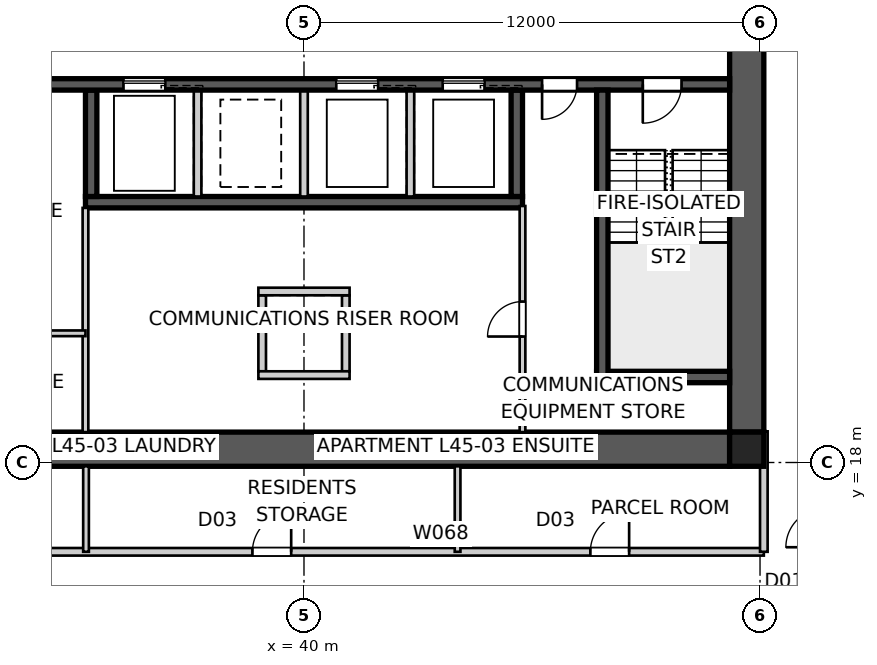
"""IFC4 building model, lengths in metres.
Left out: names, types, materials, properties, quantities, classifications, styles, units other than length and angle.
Written with IfcOpenShell. Run it as: python <this file> out.ifc"""

import sys

from ifc_helpers import new_model, si_unit, direction, frame, frame_2d, origin, origin_2d, place, context, subcontext, project, spatial, polyline, rectangle, outline, extrude, element, fill, save


model = new_model("IFC4")
c1 = context("Model", 3, precision=1e-05, world=origin(), true_north=direction((0.0, 1.0)))
c2 = subcontext(c1, "Body", "Model", "MODEL_VIEW")
j1 = project(units=[si_unit("LENGTHUNIT", "METRE"), si_unit("PLANEANGLEUNIT", "RADIAN")], contexts=[c1])
p1 = place(None, origin())
s1 = spatial("IfcSite", under=j1, at=p1, CompositionType="ELEMENT")
p2 = place(p1, origin())
s2 = spatial("IfcBuilding", under=s1, at=p2, CompositionType="ELEMENT")
p3 = place(p2, frame((0.0, 0.0, 164.2)))
s3 = spatial("IfcBuildingStorey", under=s2, at=p3, CompositionType="ELEMENT", Elevation=164.2)
p4 = place(p3, frame((51.2, 18.35, 0.0), z_axis=(0.0, 0.0, 1.0), x_axis=(-1.0, 0.0, 0.0)))
e1 = element("IfcWall", 1, at=p4, inside=s3, PredefinedType="SHEAR", context=c2, shape_type="SweptSolid", body=[
    extrude(outline(polyline([(0.0, -0.45), (22.4, -0.45), (22.4, -0.025), (22.85, -0.025), (22.85, 0.025), (22.4, 0.025), (22.4, 0.45), (0.0, 0.45), (0.0, 0.025), (-0.45, 0.025), (-0.45, -0.025), (0.0, -0.025), (0.0, -0.45)])), origin(), (0.0, 0.0, 1.0), 3.4),
])
p5 = place(p3, frame((51.65, 18.8, 0.0), z_axis=(0.0, 0.0, 1.0), x_axis=(0.0, 1.0, 0.0)))
e2 = element("IfcWall", 2, at=p5, inside=s3, PredefinedType="SHEAR", context=c2, shape_type="SweptSolid", body=[
    extrude(outline(polyline([(0.0, -0.45), (22.4, -0.45), (22.4, -0.025), (22.85, -0.025), (22.85, 0.025), (22.4, 0.025), (22.4, 0.45), (0.0, 0.45), (0.0, 0.025), (-0.45, 0.025), (-0.45, -0.025), (0.0, -0.025), (0.0, -0.45)])), origin(), (0.0, 0.0, 1.0), 3.4),
])
p6 = place(p5, frame((11.14, 0.0, 0.0)))
e3 = element("IfcOpeningElement", 3, at=p6, cuts=e2, PredefinedType="OPENING", context=c2, shape_type="SweptSolid", body=[
    extrude(rectangle(XDim=1.02, YDim=2.4, at=frame_2d((0.51, 1.2))), frame((0.0, 0.46, 0.0), z_axis=(0.0, -1.0, 0.0), x_axis=(1.0, 0.0, 0.0)), (0.0, 0.0, 1.0), 0.92),
])
p7 = place(p3, frame((51.2, 27.95, 0.0), z_axis=(0.0, 0.0, 1.0), x_axis=(-1.0, 0.0, 0.0)))
e4 = element("IfcWall", 4, at=p7, inside=s3, PredefinedType="SHEAR", context=c2, shape_type="SweptSolid", body=[
    extrude(rectangle(XDim=22.4, YDim=0.3, at=frame_2d((11.2, 0.0))), origin(), (0.0, 0.0, 1.0), 3.4),
])
p8 = place(p7, frame((19.04, 0.0, 0.0)))
e5 = element("IfcOpeningElement", 5, at=p8, cuts=e4, PredefinedType="OPENING", context=c2, shape_type="SweptSolid", body=[
    extrude(rectangle(XDim=0.92, YDim=2.1, at=frame_2d((0.46, 1.05))), frame((0.0, 0.16, 0.0), z_axis=(0.0, -1.0, 0.0), x_axis=(1.0, 0.0, 0.0)), (0.0, 0.0, 1.0), 0.32),
])
p9 = place(p7, frame((1.265, 0.0, 0.0)))
e6 = element("IfcOpeningElement", 6, at=p9, cuts=e4, PredefinedType="OPENING", context=c2, shape_type="SweptSolid", body=[
    extrude(rectangle(XDim=1.02, YDim=2.1, at=frame_2d((0.51, 1.05))), frame((0.0, 0.16, 0.0), z_axis=(0.0, -1.0, 0.0), x_axis=(1.0, 0.0, 0.0)), (0.0, 0.0, 1.0), 0.32),
])
p10 = place(p7, frame((4.015, 0.0, 0.0)))
e7 = element("IfcOpeningElement", 7, at=p10, cuts=e4, PredefinedType="OPENING", context=c2, shape_type="SweptSolid", body=[
    extrude(rectangle(XDim=0.92, YDim=2.1, at=frame_2d((0.46, 1.05))), frame((0.0, 0.16, 0.0), z_axis=(0.0, -1.0, 0.0), x_axis=(1.0, 0.0, 0.0)), (0.0, 0.0, 1.0), 0.32),
])
p11 = place(p7, frame((6.45, 0.0, 0.0)))
e8 = element("IfcOpeningElement", 8, at=p11, cuts=e4, PredefinedType="OPENING", context=c2, shape_type="SweptSolid", body=[
    extrude(rectangle(XDim=1.1, YDim=2.1, at=frame_2d((0.55, 1.05))), frame((0.0, 0.16, 0.0), z_axis=(0.0, -1.0, 0.0), x_axis=(1.0, 0.0, 0.0)), (0.0, 0.0, 1.0), 0.32),
])
p12 = place(p7, frame((9.25, 0.0, 0.0)))
e9 = element("IfcOpeningElement", 9, at=p12, cuts=e4, PredefinedType="OPENING", context=c2, shape_type="SweptSolid", body=[
    extrude(rectangle(XDim=1.1, YDim=2.1, at=frame_2d((0.55, 1.05))), frame((0.0, 0.16, 0.0), z_axis=(0.0, -1.0, 0.0), x_axis=(1.0, 0.0, 0.0)), (0.0, 0.0, 1.0), 0.32),
])
p13 = place(p7, frame((14.85, 0.0, 0.0)))
e10 = element("IfcOpeningElement", 10, at=p13, cuts=e4, PredefinedType="OPENING", context=c2, shape_type="SweptSolid", body=[
    extrude(rectangle(XDim=1.1, YDim=2.1, at=frame_2d((0.55, 1.05))), frame((0.0, 0.16, 0.0), z_axis=(0.0, -1.0, 0.0), x_axis=(1.0, 0.0, 0.0)), (0.0, 0.0, 1.0), 0.32),
])
p14 = place(p3, frame((45.75, 24.85, 0.0), z_axis=(0.0, 0.0, 1.0), x_axis=(-1.0, 0.0, 0.0)))
e11 = element("IfcWall", 11, at=p14, inside=s3, PredefinedType="SHEAR", context=c2, shape_type="SweptSolid", body=[
    extrude(rectangle(XDim=11.5, YDim=0.3, at=frame_2d((5.75, 0.0))), origin(), (0.0, 0.0, 1.0), 3.4),
])
p15 = place(p3, frame((45.6, 27.8, 0.0), z_axis=(0.0, 0.0, 1.0), x_axis=(0.0, -1.0, 0.0)))
e12 = element("IfcWall", 12, at=p15, inside=s3, PredefinedType="SHEAR", context=c2, shape_type="SweptSolid", body=[
    extrude(rectangle(XDim=2.8, YDim=0.3, at=frame_2d((1.4, 0.0))), origin(), (0.0, 0.0, 1.0), 3.4),
])
for number, where, z_axis, x_axis in (
    (13, (42.8, 27.8, 0.0), (0.0, 0.0, 1.0), (0.0, -1.0, 0.0)),
    (14, (40.0, 27.8, 0.0), (0.0, 0.0, 1.0), (0.0, -1.0, 0.0)),
    (15, (37.2, 27.8, 0.0), (0.0, 0.0, 1.0), (0.0, -1.0, 0.0)),
):
    element("IfcWall", number, at=place(p3, frame(where, z_axis=z_axis, x_axis=x_axis)), inside=s3, PredefinedType="SOLIDWALL", context=c2, shape_type="SweptSolid", body=[
        extrude(rectangle(XDim=2.8, YDim=0.2, at=frame_2d((1.4, 0.0))), origin(), (0.0, 0.0, 1.0), 3.4),
    ])
p16 = place(p3, frame((34.4, 27.8, 0.0), z_axis=(0.0, 0.0, 1.0), x_axis=(0.0, -1.0, 0.0)))
e16 = element("IfcWall", 16, at=p16, inside=s3, PredefinedType="SHEAR", context=c2, shape_type="SweptSolid", body=[
    extrude(rectangle(XDim=2.8, YDim=0.3, at=frame_2d((1.4, 0.0))), origin(), (0.0, 0.0, 1.0), 3.4),
])
p17 = place(p3, frame((47.85, 27.8, 0.0), z_axis=(0.0, 0.0, 1.0), x_axis=(0.0, -1.0, 0.0)))
e17 = element("IfcWall", 17, at=p17, inside=s3, PredefinedType="SHEAR", context=c2, shape_type="SweptSolid", body=[
    extrude(rectangle(XDim=7.7, YDim=0.3, at=frame_2d((3.85, 0.0))), origin(), (0.0, 0.0, 1.0), 3.4),
])
p18 = place(p3, frame((51.2, 20.25, 0.0), z_axis=(0.0, 0.0, 1.0), x_axis=(-1.0, 0.0, 0.0)))
e18 = element("IfcWall", 18, at=p18, inside=s3, PredefinedType="SHEAR", context=c2, shape_type="SweptSolid", body=[
    extrude(rectangle(XDim=3.5, YDim=0.3, at=frame_2d((1.75, 0.0))), origin(), (0.0, 0.0, 1.0), 3.4),
])
for number, where, z_axis, x_axis in (
    (19, (38.9, 22.4, 0.0), (0.0, 0.0, 1.0), (0.0, -1.0, 0.0)),
    (20, (41.1, 22.4, 0.0), (0.0, 0.0, 1.0), (0.0, -1.0, 0.0)),
):
    element("IfcWall", number, at=place(p3, frame(where, z_axis=z_axis, x_axis=x_axis)), inside=s3, PredefinedType="SOLIDWALL", context=c2, shape_type="SweptSolid", body=[
        extrude(rectangle(XDim=2.0, YDim=0.2, at=frame_2d((1.0, 0.0))), origin(), (0.0, 0.0, 1.0), 3.4),
    ])
for number, where, z_axis, x_axis in (
    (21, (38.8, 22.5, 0.0), (0.0, 0.0, 1.0), (1.0, 0.0, 0.0)),
    (22, (38.8, 20.3, 0.0), (0.0, 0.0, 1.0), (1.0, 0.0, 0.0)),
):
    element("IfcWall", number, at=place(p3, frame(where, z_axis=z_axis, x_axis=x_axis)), inside=s3, PredefinedType="SOLIDWALL", context=c2, shape_type="SweptSolid", body=[
        extrude(rectangle(XDim=2.4, YDim=0.2, at=frame_2d((1.2, 0.0))), origin(), (0.0, 0.0, 1.0), 3.4),
    ])
p19 = place(p3, frame((51.65, 18.35, 0.0), z_axis=(0.0, 0.0, 1.0), x_axis=(1.0, 0.0, 0.0)))
e23 = element("IfcColumn", 23, at=p19, inside=s3, PredefinedType="COLUMN", context=c2, shape_type="SweptSolid", body=[
    extrude(rectangle(XDim=0.9, YDim=0.9, at=origin_2d()), origin(), (0.0, 0.0, 1.0), 3.4),
])
p20 = place(p3, frame((45.75, 18.8, 0.0), z_axis=(0.0, 0.0, 1.0), x_axis=(0.0, 1.0, 0.0)))
e24 = element("IfcWall", 24, at=p20, inside=s3, PredefinedType="SOLIDWALL", context=c2, shape_type="SweptSolid", body=[
    extrude(rectangle(XDim=5.95, YDim=0.15, at=frame_2d((2.975, 0.0))), origin(), (0.0, 0.0, 1.0), 3.25),
])
p21 = place(p20, frame((2.515, 0.0, 0.0)))
e25 = element("IfcOpeningElement", 25, at=p21, cuts=e24, PredefinedType="OPENING", context=c2, shape_type="SweptSolid", body=[
    extrude(rectangle(XDim=0.92, YDim=2.1, at=frame_2d((0.46, 1.05))), frame((0.0, 0.085, 0.0), z_axis=(0.0, -1.0, 0.0), x_axis=(1.0, 0.0, 0.0)), (0.0, 0.0, 1.0), 0.17),
])
p22 = place(p3, frame((34.25, 18.8, 0.0), z_axis=(0.0, 0.0, 1.0), x_axis=(0.0, 1.0, 0.0)))
e26 = element("IfcWall", 26, at=p22, inside=s3, PredefinedType="SOLIDWALL", context=c2, shape_type="SweptSolid", body=[
    extrude(rectangle(XDim=5.9, YDim=0.15, at=frame_2d((2.95, 0.0))), origin(), (0.0, 0.0, 1.0), 3.25),
])
p23 = place(p3, frame((34.25, 21.4, 0.0), z_axis=(0.0, 0.0, 1.0), x_axis=(-1.0, 0.0, 0.0)))
e27 = element("IfcWall", 27, at=p23, inside=s3, PredefinedType="SOLIDWALL", context=c2, shape_type="SweptSolid", body=[
    extrude(rectangle(XDim=5.45, YDim=0.15, at=frame_2d((2.725, 0.0))), origin(), (0.0, 0.0, 1.0), 3.25),
])
p24 = place(p23, frame((2.265, 0.0, 0.0)))
e28 = element("IfcOpeningElement", 28, at=p24, cuts=e27, PredefinedType="OPENING", context=c2, shape_type="SweptSolid", body=[
    extrude(rectangle(XDim=0.92, YDim=2.1, at=frame_2d((0.46, 1.05))), frame((0.0, 0.085, 0.0), z_axis=(0.0, -1.0, 0.0), x_axis=(1.0, 0.0, 0.0)), (0.0, 0.0, 1.0), 0.17),
])
p25 = place(p3, frame((27.9, 15.65, 0.0), z_axis=(0.0, 0.0, 1.0), x_axis=(1.0, 0.0, 0.0)))
e29 = element("IfcWall", 29, at=p25, inside=s3, PredefinedType="PARTITIONING", context=c2, shape_type="SweptSolid", body=[
    extrude(rectangle(XDim=24.2, YDim=0.2, at=frame_2d((12.1, 0.0))), origin(), (0.0, 0.0, 1.0), 3.25),
])
p26 = place(p25, frame((10.743, 0.0, 0.0)))
e30 = element("IfcOpeningElement", 30, at=p26, cuts=e29, PredefinedType="OPENING", context=c2, shape_type="SweptSolid", body=[
    extrude(rectangle(XDim=1.02, YDim=2.1, at=frame_2d((0.51, 1.05))), frame((0.0, 0.11, 0.0), z_axis=(0.0, -1.0, 0.0), x_axis=(1.0, 0.0, 0.0)), (0.0, 0.0, 1.0), 0.22),
])
p27 = place(p25, frame((19.636, 0.0, 0.0)))
e31 = element("IfcOpeningElement", 31, at=p27, cuts=e29, PredefinedType="OPENING", context=c2, shape_type="SweptSolid", body=[
    extrude(rectangle(XDim=1.02, YDim=2.1, at=frame_2d((0.51, 1.05))), frame((0.0, 0.11, 0.0), z_axis=(0.0, -1.0, 0.0), x_axis=(1.0, 0.0, 0.0)), (0.0, 0.0, 1.0), 0.22),
])
p28 = place(p25, frame((3.297, 0.0, 0.0)))
e32 = element("IfcOpeningElement", 32, at=p28, cuts=e29, PredefinedType="OPENING", context=c2, shape_type="SweptSolid", body=[
    extrude(rectangle(XDim=1.02, YDim=2.1, at=frame_2d((0.51, 1.05))), frame((0.0, 0.11, 0.0), z_axis=(0.0, -1.0, 0.0), x_axis=(1.0, 0.0, 0.0)), (0.0, 0.0, 1.0), 0.22),
])
p29 = place(p3, frame((52.1, 15.65, 0.0), z_axis=(0.0, 0.0, 1.0), x_axis=(0.0, 1.0, 0.0)))
e33 = element("IfcWall", 33, at=p29, inside=s3, PredefinedType="PARTITIONING", context=c2, shape_type="SweptSolid", body=[
    extrude(rectangle(XDim=3.17, YDim=0.2, at=frame_2d((1.585, 0.0))), origin(), (0.0, 0.0, 1.0), 3.25),
])
p30 = place(p3, frame((34.265, 15.65, 0.0), z_axis=(0.0, 0.0, 1.0), x_axis=(0.0, 1.0, 0.0)))
e34 = element("IfcWall", 34, at=p30, inside=s3, PredefinedType="SOLIDWALL", context=c2, shape_type="SweptSolid", body=[
    extrude(rectangle(XDim=2.25, YDim=0.15, at=frame_2d((1.125, 0.0))), origin(), (0.0, 0.0, 1.0), 2.796),
])
p31 = place(p3, frame((44.042, 15.65, 0.0), z_axis=(0.0, 0.0, 1.0), x_axis=(0.0, 1.0, 0.0)))
e35 = element("IfcWall", 35, at=p31, inside=s3, PredefinedType="SOLIDWALL", context=c2, shape_type="SweptSolid", body=[
    extrude(rectangle(XDim=2.25, YDim=0.15, at=frame_2d((1.125, 0.0))), origin(), (0.0, 0.0, 1.0), 3.25),
])
p32 = place(p9, origin())
e36 = element("IfcDoor", 36, at=p32, inside=s3, OperationType="SINGLE_SWING_RIGHT", PredefinedType="DOOR", context=c2, shape_type="SweptSolid", body=[
    extrude(rectangle(XDim=1.02, YDim=2.1, at=frame_2d((0.51, 1.05))), frame((0.0, 0.025, 0.0), z_axis=(0.0, -1.0, 0.0), x_axis=(1.0, 0.0, 0.0)), (0.0, 0.0, 1.0), 0.05),
])
fill(e6, e36)
p33 = place(p10, origin())
e37 = element("IfcDoor", 37, at=p33, inside=s3, OperationType="SINGLE_SWING_RIGHT", PredefinedType="DOOR", context=c2, shape_type="SweptSolid", body=[
    extrude(rectangle(XDim=0.92, YDim=2.1, at=frame_2d((0.46, 1.05))), frame((0.0, 0.025, 0.0), z_axis=(0.0, -1.0, 0.0), x_axis=(1.0, 0.0, 0.0)), (0.0, 0.0, 1.0), 0.05),
])
fill(e7, e37)
p34 = place(p26, origin())
e38 = element("IfcDoor", 38, at=p34, inside=s3, OperationType="SINGLE_SWING_RIGHT", PredefinedType="DOOR", context=c2, shape_type="SweptSolid", body=[
    extrude(rectangle(XDim=1.02, YDim=2.1, at=frame_2d((0.51, 1.05))), frame((0.0, 0.025, 0.0), z_axis=(0.0, -1.0, 0.0), x_axis=(1.0, 0.0, 0.0)), (0.0, 0.0, 1.0), 0.05),
])
fill(e30, e38)
p35 = place(p27, origin())
e39 = element("IfcDoor", 39, at=p35, inside=s3, OperationType="SINGLE_SWING_RIGHT", PredefinedType="DOOR", context=c2, shape_type="SweptSolid", body=[
    extrude(rectangle(XDim=1.02, YDim=2.1, at=frame_2d((0.51, 1.05))), frame((0.0, 0.025, 0.0), z_axis=(0.0, -1.0, 0.0), x_axis=(1.0, 0.0, 0.0)), (0.0, 0.0, 1.0), 0.05),
])
fill(e31, e39)
p36 = place(p21, origin())
e40 = element("IfcDoor", 40, at=p36, inside=s3, OperationType="SINGLE_SWING_LEFT", PredefinedType="DOOR", context=c2, shape_type="SweptSolid", body=[
    extrude(rectangle(XDim=0.92, YDim=2.1, at=frame_2d((0.46, 1.05))), frame((0.0, 0.025, 0.0), z_axis=(0.0, -1.0, 0.0), x_axis=(1.0, 0.0, 0.0)), (0.0, 0.0, 1.0), 0.05),
])
fill(e25, e40)
p37 = place(p11, origin())
e41 = element("IfcDoor", 41, at=p37, inside=s3, OperationType="SLIDING_TO_LEFT", PredefinedType="DOOR", context=c2, shape_type="SweptSolid", body=[
    extrude(rectangle(XDim=1.1, YDim=2.1, at=frame_2d((0.55, 1.05))), frame((0.0, 0.025, 0.0), z_axis=(0.0, -1.0, 0.0), x_axis=(1.0, 0.0, 0.0)), (0.0, 0.0, 1.0), 0.05),
])
fill(e8, e41)
p38 = place(p12, origin())
e42 = element("IfcDoor", 42, at=p38, inside=s3, OperationType="SLIDING_TO_LEFT", PredefinedType="DOOR", context=c2, shape_type="SweptSolid", body=[
    extrude(rectangle(XDim=1.1, YDim=2.1, at=frame_2d((0.55, 1.05))), frame((0.0, 0.025, 0.0), z_axis=(0.0, -1.0, 0.0), x_axis=(1.0, 0.0, 0.0)), (0.0, 0.0, 1.0), 0.05),
])
fill(e9, e42)
p39 = place(p13, origin())
e43 = element("IfcDoor", 43, at=p39, inside=s3, OperationType="SLIDING_TO_LEFT", PredefinedType="DOOR", context=c2, shape_type="SweptSolid", body=[
    extrude(rectangle(XDim=1.1, YDim=2.1, at=frame_2d((0.55, 1.05))), frame((0.0, 0.025, 0.0), z_axis=(0.0, -1.0, 0.0), x_axis=(1.0, 0.0, 0.0)), (0.0, 0.0, 1.0), 0.05),
])
fill(e10, e43)
save(model, sys.argv[1])
